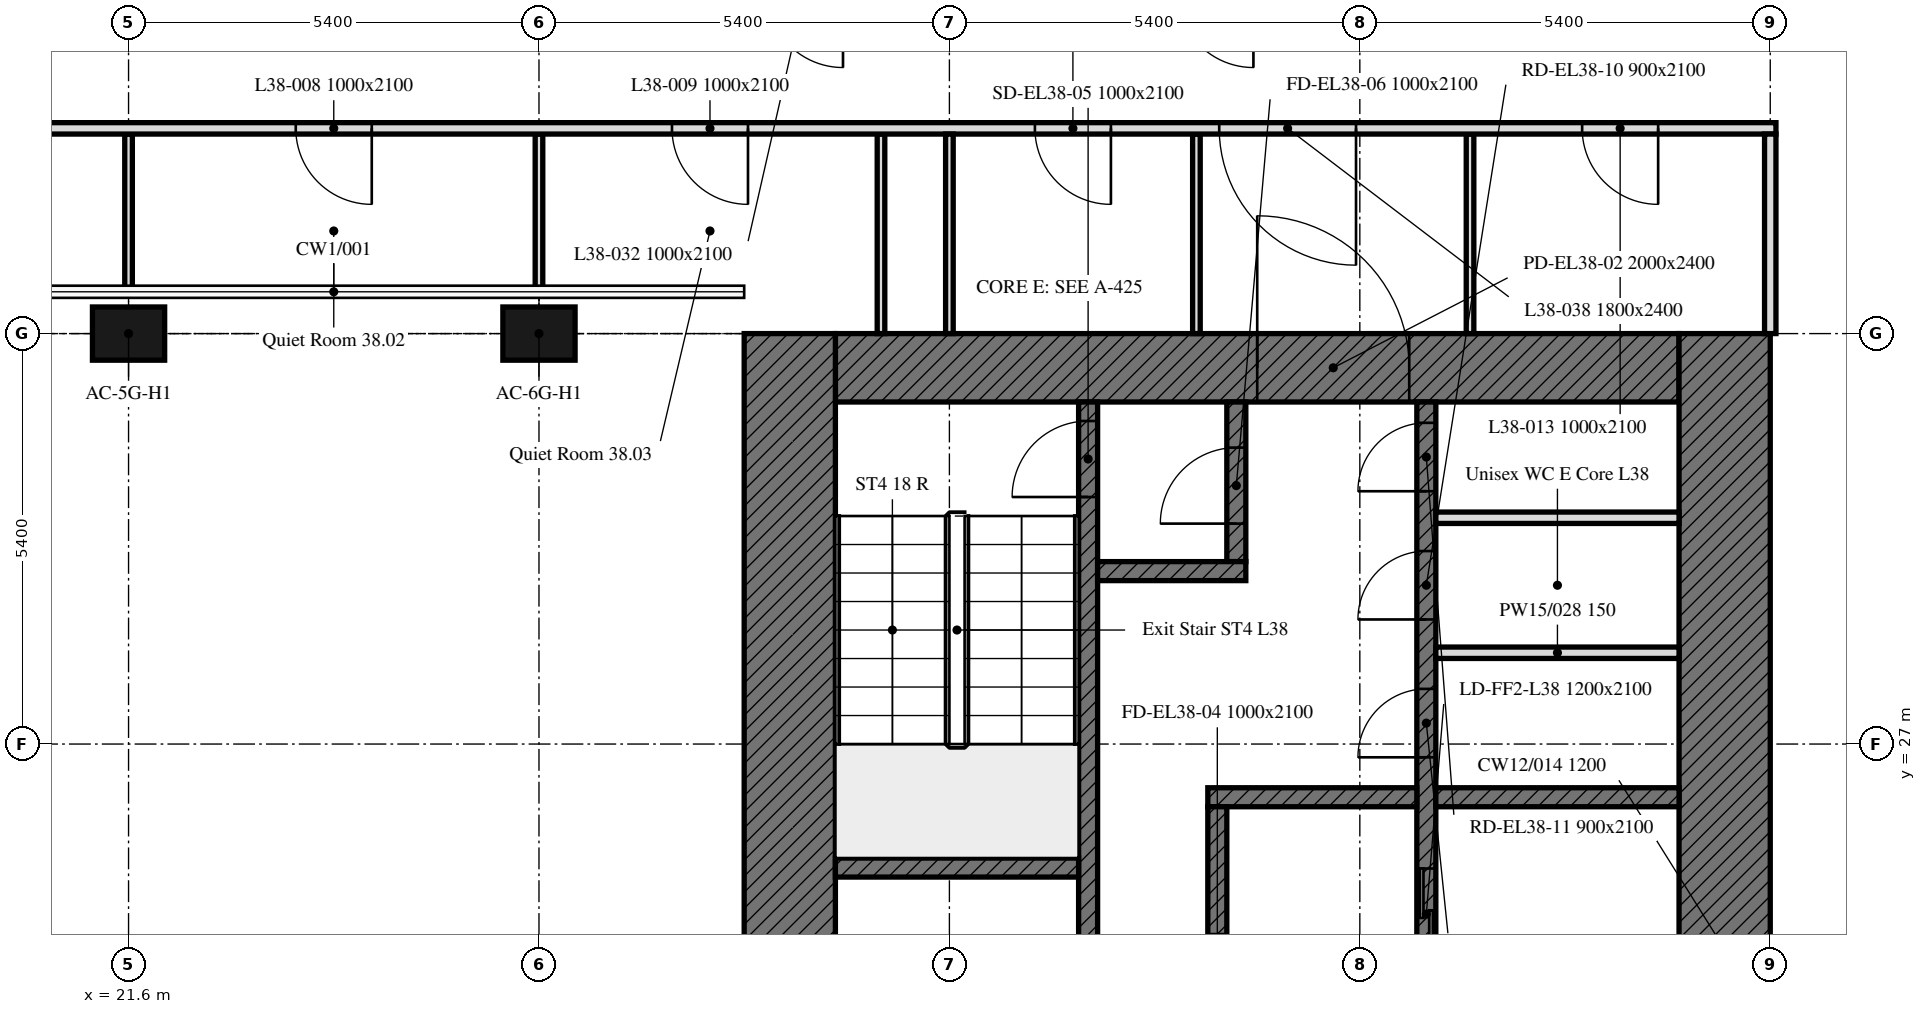
"""IFC4 building model, lengths in metres.
Left out: names, types, materials, properties, quantities, classifications, styles, units other than length and angle.
Written with IfcOpenShell. Run it as: python <this file> out.ifc"""

import sys

from ifc_helpers import new_model, si_unit, direction, frame, frame_2d, origin, origin_2d, place, context, subcontext, project, spatial, rectangle, extrude, element, fill, save


model = new_model("IFC4")
c1 = context("Model", 3, precision=1e-05, world=origin(), true_north=direction((0.0, 1.0)))
c2 = subcontext(c1, "Body", "Model", "MODEL_VIEW")
j1 = project(units=[si_unit("LENGTHUNIT", "METRE"), si_unit("PLANEANGLEUNIT", "RADIAN")], contexts=[c1])
p1 = place(None, origin())
s1 = spatial("IfcSite", under=j1, at=p1, CompositionType="ELEMENT")
p2 = place(p1, origin())
s2 = spatial("IfcBuilding", under=s1, at=p2, CompositionType="ELEMENT")
p3 = place(p2, frame((0.0, 0.0, 162.7)))
s3 = spatial("IfcBuildingStorey", under=s2, at=p3, CompositionType="ELEMENT", Elevation=162.7)
for number, where, z_axis, x_axis in (
    (1, (21.6, 32.4, 0.0), (0.0, 0.0, 1.0), (1.0, 0.0, 0.0)),
    (2, (27.0, 32.4, 0.0), (0.0, 0.0, 1.0), (1.0, 0.0, 0.0)),
):
    element("IfcColumn", number, at=place(p3, frame(where, z_axis=z_axis, x_axis=x_axis)), inside=s3, PredefinedType="COLUMN", context=c2, shape_type="SweptSolid", body=[
        extrude(rectangle(XDim=0.95, YDim=0.7, at=origin_2d()), origin(), (0.0, 0.0, 1.0), 3.0),
    ])
p4 = place(p3, frame((30.9, 31.95, 0.0), z_axis=(0.0, 0.0, 1.0), x_axis=(1.0, 0.0, 0.0)))
e3 = element("IfcWall", 3, at=p4, inside=s3, PredefinedType="SOLIDWALL", context=c2, shape_type="SweptSolid", body=[
    extrude(rectangle(XDim=11.1, YDim=0.9, at=frame_2d((5.55, 0.0))), origin(), (0.0, 0.0, 1.0), 3.0),
])
p5 = place(p4, frame((5.55, 0.0, 0.0)))
e4 = element("IfcOpeningElement", 4, at=p5, cuts=e3, PredefinedType="OPENING", context=c2, shape_type="SweptSolid", body=[
    extrude(rectangle(XDim=2.0, YDim=2.4, at=frame_2d((1.0, 1.2))), frame((0.0, 0.45, 0.0), z_axis=(0.0, -1.0, 0.0), x_axis=(1.0, 0.0, 0.0)), (0.0, 0.0, 1.0), 0.9),
])
for number, where, z_axis, x_axis in (
    (5, (42.6, 32.4, 0.0), (0.0, 0.0, 1.0), (0.0, -1.0, 0.0)),
    (6, (30.3, 16.2, 0.0), (0.0, 0.0, 1.0), (0.0, 1.0, 0.0)),
):
    element("IfcWall", number, at=place(p3, frame(where, z_axis=z_axis, x_axis=x_axis)), inside=s3, PredefinedType="SOLIDWALL", context=c2, shape_type="SweptSolid", body=[
        extrude(rectangle(XDim=16.2, YDim=1.2, at=frame_2d((8.1, 0.0))), origin(), (0.0, 0.0, 1.0), 3.0),
    ])
p6 = place(p3, frame((38.675, 17.1, 0.0), z_axis=(0.0, 0.0, 1.0), x_axis=(0.0, 1.0, 0.0)))
e7 = element("IfcWall", 7, at=p6, inside=s3, PredefinedType="SOLIDWALL", context=c2, shape_type="SweptSolid", body=[
    extrude(rectangle(XDim=14.4, YDim=0.25, at=frame_2d((7.2, 0.0))), origin(), (0.0, 0.0, 1.0), 3.0),
])
p7 = place(p6, frame((4.6, 0.0, 0.0)))
e8 = element("IfcOpeningElement", 8, at=p7, cuts=e7, PredefinedType="OPENING", context=c2, shape_type="SweptSolid", body=[
    extrude(rectangle(XDim=1.0, YDim=2.1, at=frame_2d((0.5, 1.05))), frame((0.0, 0.125, 0.0), z_axis=(0.0, -1.0, 0.0), x_axis=(1.0, 0.0, 0.0)), (0.0, 0.0, 1.0), 0.25),
])
p8 = place(p6, frame((7.062, 0.0, 0.0)))
e9 = element("IfcOpeningElement", 9, at=p8, cuts=e7, PredefinedType="OPENING", context=c2, shape_type="SweptSolid", body=[
    extrude(rectangle(XDim=1.2, YDim=2.1, at=frame_2d((0.6, 1.05))), frame((0.0, 0.125, 0.0), z_axis=(0.0, -1.0, 0.0), x_axis=(1.0, 0.0, 0.0)), (0.0, 0.0, 1.0), 0.25),
])
p9 = place(p6, frame((9.726, 0.0, 0.0)))
e10 = element("IfcOpeningElement", 10, at=p9, cuts=e7, PredefinedType="OPENING", context=c2, shape_type="SweptSolid", body=[
    extrude(rectangle(XDim=0.9, YDim=2.1, at=frame_2d((0.45, 1.05))), frame((0.0, 0.125, 0.0), z_axis=(0.0, -1.0, 0.0), x_axis=(1.0, 0.0, 0.0)), (0.0, 0.0, 1.0), 0.25),
])
p10 = place(p6, frame((11.539, 0.0, 0.0)))
e11 = element("IfcOpeningElement", 11, at=p10, cuts=e7, PredefinedType="OPENING", context=c2, shape_type="SweptSolid", body=[
    extrude(rectangle(XDim=0.9, YDim=2.1, at=frame_2d((0.45, 1.05))), frame((0.0, 0.125, 0.0), z_axis=(0.0, -1.0, 0.0), x_axis=(1.0, 0.0, 0.0)), (0.0, 0.0, 1.0), 0.25),
])
p11 = place(p6, frame((13.226, 0.0, 0.0)))
e12 = element("IfcOpeningElement", 12, at=p11, cuts=e7, PredefinedType="OPENING", context=c2, shape_type="SweptSolid", body=[
    extrude(rectangle(XDim=0.9, YDim=2.1, at=frame_2d((0.45, 1.05))), frame((0.0, 0.125, 0.0), z_axis=(0.0, -1.0, 0.0), x_axis=(1.0, 0.0, 0.0)), (0.0, 0.0, 1.0), 0.25),
])
p12 = place(p3, frame((34.225, 17.1, 0.0), z_axis=(0.0, 0.0, 1.0), x_axis=(0.0, 1.0, 0.0)))
e13 = element("IfcWall", 13, at=p12, inside=s3, PredefinedType="SOLIDWALL", context=c2, shape_type="SweptSolid", body=[
    extrude(rectangle(XDim=14.4, YDim=0.25, at=frame_2d((7.2, 0.0))), origin(), (0.0, 0.0, 1.0), 3.0),
])
p13 = place(p12, frame((13.15, 0.0, 0.0)))
e14 = element("IfcOpeningElement", 14, at=p13, cuts=e13, PredefinedType="OPENING", context=c2, shape_type="SweptSolid", body=[
    extrude(rectangle(XDim=1.0, YDim=2.1, at=frame_2d((0.5, 1.05))), frame((0.0, 0.125, 0.0), z_axis=(0.0, -1.0, 0.0), x_axis=(1.0, 0.0, 0.0)), (0.0, 0.0, 1.0), 0.25),
])
p14 = place(p12, frame((0.6, 0.0, 0.0)))
e15 = element("IfcOpeningElement", 15, at=p14, cuts=e13, PredefinedType="OPENING", context=c2, shape_type="SweptSolid", body=[
    extrude(rectangle(XDim=1.1, YDim=2.1, at=frame_2d((0.55, 1.05))), frame((0.0, 0.125, 0.0), z_axis=(0.0, -1.0, 0.0), x_axis=(1.0, 0.0, 0.0)), (0.0, 0.0, 1.0), 0.25),
])
p15 = place(p12, frame((3.25, 0.0, 0.0)))
e16 = element("IfcOpeningElement", 16, at=p15, cuts=e13, PredefinedType="OPENING", context=c2, shape_type="SweptSolid", body=[
    extrude(rectangle(XDim=0.9, YDim=2.1, at=frame_2d((0.45, 1.05))), frame((0.0, 0.125, 0.0), z_axis=(0.0, -1.0, 0.0), x_axis=(1.0, 0.0, 0.0)), (0.0, 0.0, 1.0), 0.25),
])
p16 = place(p3, frame((30.9, 25.375, 0.0), z_axis=(0.0, 0.0, 1.0), x_axis=(1.0, 0.0, 0.0)))
e17 = element("IfcWall", 17, at=p16, inside=s3, PredefinedType="SOLIDWALL", context=c2, shape_type="SweptSolid", body=[
    extrude(rectangle(XDim=3.2, YDim=0.25, at=frame_2d((1.6, 0.0))), origin(), (0.0, 0.0, 1.0), 3.0),
])
p17 = place(p3, frame((38.8, 26.3, 0.0), z_axis=(0.0, 0.0, 1.0), x_axis=(1.0, 0.0, 0.0)))
e18 = element("IfcWall", 18, at=p17, inside=s3, PredefinedType="SOLIDWALL", context=c2, shape_type="SweptSolid", body=[
    extrude(rectangle(XDim=3.2, YDim=0.25, at=frame_2d((1.6, 0.0))), origin(), (0.0, 0.0, 1.0), 3.0),
])
p18 = place(p3, frame((35.8, 26.3, 0.0), z_axis=(0.0, 0.0, 1.0), x_axis=(1.0, 0.0, 0.0)))
e19 = element("IfcWall", 19, at=p18, inside=s3, PredefinedType="SOLIDWALL", context=c2, shape_type="SweptSolid", body=[
    extrude(rectangle(XDim=2.75, YDim=0.25, at=frame_2d((1.375, 0.0))), origin(), (0.0, 0.0, 1.0), 3.0),
])
p19 = place(p3, frame((36.175, 29.4, 0.0), z_axis=(0.0, 0.0, 1.0), x_axis=(0.0, 1.0, 0.0)))
e20 = element("IfcWall", 20, at=p19, inside=s3, PredefinedType="SOLIDWALL", context=c2, shape_type="SweptSolid", body=[
    extrude(rectangle(XDim=2.1, YDim=0.25, at=frame_2d((1.05, 0.0))), origin(), (0.0, 0.0, 1.0), 3.0),
])
p20 = place(p19, frame((0.5, 0.0, 0.0)))
e21 = element("IfcOpeningElement", 21, at=p20, cuts=e20, PredefinedType="OPENING", context=c2, shape_type="SweptSolid", body=[
    extrude(rectangle(XDim=1.0, YDim=2.1, at=frame_2d((0.5, 1.05))), frame((0.0, 0.125, 0.0), z_axis=(0.0, -1.0, 0.0), x_axis=(1.0, 0.0, 0.0)), (0.0, 0.0, 1.0), 0.25),
])
p21 = place(p3, frame((34.35, 29.275, 0.0), z_axis=(0.0, 0.0, 1.0), x_axis=(1.0, 0.0, 0.0)))
e22 = element("IfcWall", 22, at=p21, inside=s3, PredefinedType="SOLIDWALL", context=c2, shape_type="SweptSolid", body=[
    extrude(rectangle(XDim=1.95, YDim=0.25, at=frame_2d((0.975, 0.0))), origin(), (0.0, 0.0, 1.0), 3.0),
])
p22 = place(p3, frame((35.925, 20.55, 0.0), z_axis=(0.0, 0.0, 1.0), x_axis=(0.0, 1.0, 0.0)))
e23 = element("IfcWall", 23, at=p22, inside=s3, PredefinedType="SOLIDWALL", context=c2, shape_type="SweptSolid", body=[
    extrude(rectangle(XDim=5.625, YDim=0.25, at=frame_2d((2.812, 0.0))), origin(), (0.0, 0.0, 1.0), 3.0),
])
p23 = place(p22, frame((2.95, 0.0, 0.0)))
e24 = element("IfcOpeningElement", 24, at=p23, cuts=e23, PredefinedType="OPENING", context=c2, shape_type="SweptSolid", body=[
    extrude(rectangle(XDim=1.0, YDim=2.1, at=frame_2d((0.5, 1.05))), frame((0.0, 0.125, 0.0), z_axis=(0.0, -1.0, 0.0), x_axis=(1.0, 0.0, 0.0)), (0.0, 0.0, 1.0), 0.25),
])
for number, where, z_axis, x_axis in (
    (25, (38.8, 28.201, 0.0), (0.0, 0.0, 1.0), (1.0, 0.0, 0.0)),
    (26, (38.8, 29.977, 0.0), (0.0, 0.0, 1.0), (1.0, 0.0, 0.0)),
):
    element("IfcWall", number, at=place(p3, frame(where, z_axis=z_axis, x_axis=x_axis)), inside=s3, PredefinedType="PARTITIONING", context=c2, shape_type="SweptSolid", body=[
        extrude(rectangle(XDim=3.2, YDim=0.15, at=frame_2d((1.6, 0.0))), origin(), (0.0, 0.0, 1.0), 3.0),
    ])
for number, where, z_axis, x_axis in (
    (27, (21.6, 35.025, 0.0), (0.0, 0.0, 1.0), (0.0, -1.0, 0.0)),
    (28, (27.0, 32.895, 0.0), (0.0, 0.0, 1.0), (0.0, 1.0, 0.0)),
):
    element("IfcWall", number, at=place(p3, frame(where, z_axis=z_axis, x_axis=x_axis)), inside=s3, PredefinedType="PARTITIONING", context=c2, shape_type="SweptSolid", body=[
        extrude(rectangle(XDim=2.13, YDim=0.1, at=frame_2d((1.065, 0.0))), origin(), (0.0, 0.0, 1.0), 3.0),
    ])
for number, where, z_axis, x_axis in (
    (29, (31.5, 32.4, 0.0), (0.0, 0.0, 1.0), (0.0, 1.0, 0.0)),
    (30, (35.65, 35.025, 0.0), (0.0, 0.0, 1.0), (0.0, -1.0, 0.0)),
    (31, (39.25, 32.4, 0.0), (0.0, 0.0, 1.0), (0.0, 1.0, 0.0)),
):
    element("IfcWall", number, at=place(p3, frame(where, z_axis=z_axis, x_axis=x_axis)), inside=s3, PredefinedType="PARTITIONING", context=c2, shape_type="SweptSolid", body=[
        extrude(rectangle(XDim=2.625, YDim=0.1, at=frame_2d((1.312, 0.0))), origin(), (0.0, 0.0, 1.0), 3.0),
    ])
p24 = place(p3, frame((43.275, 35.1, 0.0), z_axis=(0.0, 0.0, 1.0), x_axis=(-1.0, 0.0, 0.0)))
e32 = element("IfcWall", 32, at=p24, inside=s3, PredefinedType="PARTITIONING", context=c2, shape_type="SweptSolid", body=[
    extrude(rectangle(XDim=37.124, YDim=0.15, at=frame_2d((18.562, 0.0))), origin(), (0.0, 0.0, 1.0), 3.0),
])
p25 = place(p24, frame((24.775, 0.0, 0.0)))
e33 = element("IfcOpeningElement", 33, at=p25, cuts=e32, PredefinedType="OPENING", context=c2, shape_type="SweptSolid", body=[
    extrude(rectangle(XDim=1.0, YDim=2.1, at=frame_2d((0.5, 1.05))), frame((0.0, 0.075, 0.0), z_axis=(0.0, -1.0, 0.0), x_axis=(1.0, 0.0, 0.0)), (0.0, 0.0, 1.0), 0.15),
])
p26 = place(p24, frame((18.475, 0.0, 0.0)))
e34 = element("IfcOpeningElement", 34, at=p26, cuts=e32, PredefinedType="OPENING", context=c2, shape_type="SweptSolid", body=[
    extrude(rectangle(XDim=1.0, YDim=2.1, at=frame_2d((0.5, 1.05))), frame((0.0, 0.075, 0.0), z_axis=(0.0, -1.0, 0.0), x_axis=(1.0, 0.0, 0.0)), (0.0, 0.0, 1.0), 0.15),
])
p27 = place(p24, frame((13.525, 0.0, 0.0)))
e35 = element("IfcOpeningElement", 35, at=p27, cuts=e32, PredefinedType="OPENING", context=c2, shape_type="SweptSolid", body=[
    extrude(rectangle(XDim=1.0, YDim=2.1, at=frame_2d((0.5, 1.05))), frame((0.0, 0.075, 0.0), z_axis=(0.0, -1.0, 0.0), x_axis=(1.0, 0.0, 0.0)), (0.0, 0.0, 1.0), 0.15),
])
p28 = place(p24, frame((34.095, 0.0, 0.0)))
e36 = element("IfcOpeningElement", 36, at=p28, cuts=e32, PredefinedType="OPENING", context=c2, shape_type="SweptSolid", body=[
    extrude(rectangle(XDim=1.0, YDim=2.1, at=frame_2d((0.5, 1.05))), frame((0.0, 0.075, 0.0), z_axis=(0.0, -1.0, 0.0), x_axis=(1.0, 0.0, 0.0)), (0.0, 0.0, 1.0), 0.15),
])
p29 = place(p24, frame((8.75, 0.0, 0.0)))
e37 = element("IfcOpeningElement", 37, at=p29, cuts=e32, PredefinedType="OPENING", context=c2, shape_type="SweptSolid", body=[
    extrude(rectangle(XDim=1.0, YDim=2.1, at=frame_2d((0.5, 1.05))), frame((0.0, 0.075, 0.0), z_axis=(0.0, -1.0, 0.0), x_axis=(1.0, 0.0, 0.0)), (0.0, 0.0, 1.0), 0.15),
])
p30 = place(p24, frame((1.55, 0.0, 0.0)))
e38 = element("IfcOpeningElement", 38, at=p30, cuts=e32, PredefinedType="OPENING", context=c2, shape_type="SweptSolid", body=[
    extrude(rectangle(XDim=1.0, YDim=2.1, at=frame_2d((0.5, 1.05))), frame((0.0, 0.075, 0.0), z_axis=(0.0, -1.0, 0.0), x_axis=(1.0, 0.0, 0.0)), (0.0, 0.0, 1.0), 0.15),
])
p31 = place(p24, frame((28.2, 0.0, 0.0)))
e39 = element("IfcOpeningElement", 39, at=p31, cuts=e32, PredefinedType="OPENING", context=c2, shape_type="SweptSolid", body=[
    extrude(rectangle(XDim=1.0, YDim=2.1, at=frame_2d((0.5, 1.05))), frame((0.0, 0.075, 0.0), z_axis=(0.0, -1.0, 0.0), x_axis=(1.0, 0.0, 0.0)), (0.0, 0.0, 1.0), 0.15),
])
p32 = place(p24, frame((30.625, 0.0, 0.0)))
e40 = element("IfcOpeningElement", 40, at=p32, cuts=e32, PredefinedType="OPENING", context=c2, shape_type="SweptSolid", body=[
    extrude(rectangle(XDim=1.8, YDim=2.4, at=frame_2d((0.9, 1.2))), frame((0.0, 0.075, 0.0), z_axis=(0.0, -1.0, 0.0), x_axis=(1.0, 0.0, 0.0)), (0.0, 0.0, 1.0), 0.15),
])
p33 = place(p24, frame((5.525, 0.0, 0.0)))
e41 = element("IfcOpeningElement", 41, at=p33, cuts=e32, PredefinedType="OPENING", context=c2, shape_type="SweptSolid", body=[
    extrude(rectangle(XDim=1.8, YDim=2.4, at=frame_2d((0.9, 1.2))), frame((0.0, 0.075, 0.0), z_axis=(0.0, -1.0, 0.0), x_axis=(1.0, 0.0, 0.0)), (0.0, 0.0, 1.0), 0.15),
])
p34 = place(p3, frame((43.2, 35.025, 0.0), z_axis=(0.0, 0.0, 1.0), x_axis=(0.0, -1.0, 0.0)))
e42 = element("IfcWall", 42, at=p34, inside=s3, PredefinedType="PARTITIONING", context=c2, shape_type="SweptSolid", body=[
    extrude(rectangle(XDim=2.625, YDim=0.15, at=frame_2d((1.312, 0.0))), origin(), (0.0, 0.0, 1.0), 3.0),
])
p35 = place(p3, frame((32.4, 35.025, 0.0), z_axis=(0.0, 0.0, 1.0), x_axis=(0.0, -1.0, 0.0)))
e43 = element("IfcWall", 43, at=p35, inside=s3, PredefinedType="PARTITIONING", context=c2, shape_type="SweptSolid", body=[
    extrude(rectangle(XDim=2.625, YDim=0.1, at=frame_2d((1.312, 0.0))), origin(), (0.0, 0.0, 1.0), 3.0),
])
p36 = place(p5, origin())
e44 = element("IfcDoor", 44, at=p36, inside=s3, OperationType="DOUBLE_DOOR_SINGLE_SWING", PredefinedType="DOOR", context=c2, shape_type="SweptSolid", body=[
    extrude(rectangle(XDim=2.0, YDim=2.4, at=frame_2d((1.0, 1.2))), frame((0.0, 0.025, 0.0), z_axis=(0.0, -1.0, 0.0), x_axis=(1.0, 0.0, 0.0)), (0.0, 0.0, 1.0), 0.05),
])
fill(e4, e44)
p37 = place(p13, origin())
e45 = element("IfcDoor", 45, at=p37, inside=s3, OperationType="SINGLE_SWING_LEFT", PredefinedType="DOOR", context=c2, shape_type="SweptSolid", body=[
    extrude(rectangle(XDim=1.0, YDim=2.1, at=frame_2d((0.5, 1.05))), frame((0.0, 0.025, 0.0), z_axis=(0.0, -1.0, 0.0), x_axis=(1.0, 0.0, 0.0)), (0.0, 0.0, 1.0), 0.05),
])
fill(e14, e45)
p38 = place(p20, origin())
e46 = element("IfcDoor", 46, at=p38, inside=s3, OperationType="SINGLE_SWING_LEFT", PredefinedType="DOOR", context=c2, shape_type="SweptSolid", body=[
    extrude(rectangle(XDim=1.0, YDim=2.1, at=frame_2d((0.5, 1.05))), frame((0.0, 0.025, 0.0), z_axis=(0.0, -1.0, 0.0), x_axis=(1.0, 0.0, 0.0)), (0.0, 0.0, 1.0), 0.05),
])
fill(e21, e46)
p39 = place(p8, origin())
e47 = element("IfcDoor", 47, at=p39, inside=s3, OperationType="DOUBLE_DOOR_SLIDING", PredefinedType="DOOR", context=c2, shape_type="SweptSolid", body=[
    extrude(rectangle(XDim=1.2, YDim=2.1, at=frame_2d((0.6, 1.05))), frame((0.0, 0.025, 0.0), z_axis=(0.0, -1.0, 0.0), x_axis=(1.0, 0.0, 0.0)), (0.0, 0.0, 1.0), 0.05),
])
fill(e9, e47)
p40 = place(p9, origin())
e48 = element("IfcDoor", 48, at=p40, inside=s3, OperationType="SINGLE_SWING_LEFT", PredefinedType="DOOR", context=c2, shape_type="SweptSolid", body=[
    extrude(rectangle(XDim=0.9, YDim=2.1, at=frame_2d((0.45, 1.05))), frame((0.0, 0.025, 0.0), z_axis=(0.0, -1.0, 0.0), x_axis=(1.0, 0.0, 0.0)), (0.0, 0.0, 1.0), 0.05),
])
fill(e10, e48)
p41 = place(p10, origin())
e49 = element("IfcDoor", 49, at=p41, inside=s3, OperationType="SINGLE_SWING_LEFT", PredefinedType="DOOR", context=c2, shape_type="SweptSolid", body=[
    extrude(rectangle(XDim=0.9, YDim=2.1, at=frame_2d((0.45, 1.05))), frame((0.0, 0.025, 0.0), z_axis=(0.0, -1.0, 0.0), x_axis=(1.0, 0.0, 0.0)), (0.0, 0.0, 1.0), 0.05),
])
fill(e11, e49)
p42 = place(p11, origin())
e50 = element("IfcDoor", 50, at=p42, inside=s3, OperationType="SINGLE_SWING_LEFT", PredefinedType="DOOR", context=c2, shape_type="SweptSolid", body=[
    extrude(rectangle(XDim=0.9, YDim=2.1, at=frame_2d((0.45, 1.05))), frame((0.0, 0.025, 0.0), z_axis=(0.0, -1.0, 0.0), x_axis=(1.0, 0.0, 0.0)), (0.0, 0.0, 1.0), 0.05),
])
fill(e12, e50)
p43 = place(p26, origin())
e51 = element("IfcDoor", 51, at=p43, inside=s3, OperationType="SINGLE_SWING_LEFT", PredefinedType="DOOR", context=c2, shape_type="SweptSolid", body=[
    extrude(rectangle(XDim=1.0, YDim=2.1, at=frame_2d((0.5, 1.05))), frame((0.0, 0.025, 0.0), z_axis=(0.0, -1.0, 0.0), x_axis=(1.0, 0.0, 0.0)), (0.0, 0.0, 1.0), 0.05),
])
fill(e34, e51)
p44 = place(p27, origin())
e52 = element("IfcDoor", 52, at=p44, inside=s3, OperationType="SINGLE_SWING_LEFT", PredefinedType="DOOR", context=c2, shape_type="SweptSolid", body=[
    extrude(rectangle(XDim=1.0, YDim=2.1, at=frame_2d((0.5, 1.05))), frame((0.0, 0.025, 0.0), z_axis=(0.0, -1.0, 0.0), x_axis=(1.0, 0.0, 0.0)), (0.0, 0.0, 1.0), 0.05),
])
fill(e35, e52)
p45 = place(p29, origin())
e53 = element("IfcDoor", 53, at=p45, inside=s3, OperationType="SINGLE_SWING_RIGHT", PredefinedType="DOOR", context=c2, shape_type="SweptSolid", body=[
    extrude(rectangle(XDim=1.0, YDim=2.1, at=frame_2d((0.5, 1.05))), frame((0.0, 0.025, 0.0), z_axis=(0.0, -1.0, 0.0), x_axis=(1.0, 0.0, 0.0)), (0.0, 0.0, 1.0), 0.05),
])
fill(e37, e53)
p46 = place(p30, origin())
e54 = element("IfcDoor", 54, at=p46, inside=s3, OperationType="SINGLE_SWING_LEFT", PredefinedType="DOOR", context=c2, shape_type="SweptSolid", body=[
    extrude(rectangle(XDim=1.0, YDim=2.1, at=frame_2d((0.5, 1.05))), frame((0.0, 0.025, 0.0), z_axis=(0.0, -1.0, 0.0), x_axis=(1.0, 0.0, 0.0)), (0.0, 0.0, 1.0), 0.05),
])
fill(e38, e54)
p47 = place(p33, origin())
e55 = element("IfcDoor", 55, at=p47, inside=s3, OperationType="DOUBLE_DOOR_SINGLE_SWING", PredefinedType="DOOR", context=c2, shape_type="SweptSolid", body=[
    extrude(rectangle(XDim=1.8, YDim=2.4, at=frame_2d((0.9, 1.2))), frame((0.0, 0.025, 0.0), z_axis=(0.0, -1.0, 0.0), x_axis=(1.0, 0.0, 0.0)), (0.0, 0.0, 1.0), 0.05),
])
fill(e41, e55)
save(model, sys.argv[1])
